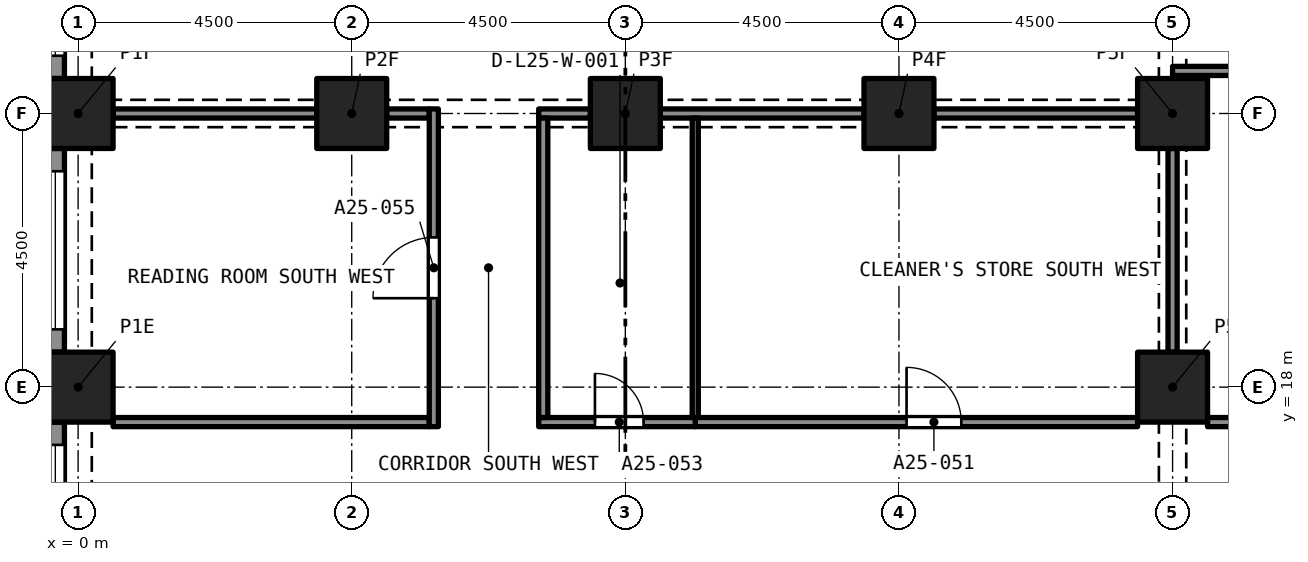
"""IFC4 building model, lengths in metres.
Left out: names, types, materials, properties, quantities, classifications, styles, units other than length and angle.
Written with IfcOpenShell. Run it as: python <this file> out.ifc"""

import sys

from ifc_helpers import new_model, si_unit, direction, frame, frame_2d, origin, origin_2d, place, context, subcontext, project, spatial, rectangle, extrude, element, fill, save


model = new_model("IFC4")
c1 = context("Model", 3, precision=1e-05, world=origin(), true_north=direction((0.0, 1.0)))
c2 = subcontext(c1, "Body", "Model", "MODEL_VIEW")
j1 = project(units=[si_unit("LENGTHUNIT", "METRE"), si_unit("PLANEANGLEUNIT", "RADIAN")], contexts=[c1])
p1 = place(None, origin())
s1 = spatial("IfcSite", under=j1, at=p1, CompositionType="ELEMENT")
p2 = place(p1, origin())
s2 = spatial("IfcBuilding", under=s1, at=p2, CompositionType="ELEMENT")
p3 = place(p2, frame((0.0, 0.0, 92.8)))
s3 = spatial("IfcBuildingStorey", under=s2, at=p3, CompositionType="ELEMENT", Elevation=92.8)
for number, where, z_axis, x_axis in (
    (1, (0.0, 18.0, 0.0), (0.0, 0.0, 1.0), (1.0, 0.0, 0.0)),
    (2, (18.0, 18.0, 0.0), (0.0, 0.0, 1.0), (1.0, 0.0, 0.0)),
    (3, (0.0, 22.5, 0.0), (0.0, 0.0, 1.0), (1.0, 0.0, 0.0)),
    (4, (4.5, 22.5, 0.0), (0.0, 0.0, 1.0), (1.0, 0.0, 0.0)),
    (5, (9.0, 22.5, 0.0), (0.0, 0.0, 1.0), (1.0, 0.0, 0.0)),
    (6, (13.5, 22.5, 0.0), (0.0, 0.0, 1.0), (1.0, 0.0, 0.0)),
    (7, (18.0, 22.5, 0.0), (0.0, 0.0, 1.0), (1.0, 0.0, 0.0)),
):
    element("IfcColumn", number, at=place(p3, frame(where, z_axis=z_axis, x_axis=x_axis)), inside=s3, PredefinedType="COLUMN", context=c2, shape_type="SweptSolid", body=[
        extrude(rectangle(XDim=1.15, YDim=1.15, at=origin_2d()), origin(), (0.0, 0.0, 1.0), 3.2),
    ])
p4 = place(p3, frame((-0.375, 23.075, 0.0), z_axis=(0.0, 0.0, 1.0), x_axis=(0.0, 1.0, 0.0)))
e8 = element("IfcWall", 8, at=p4, inside=s3, PredefinedType="SOLIDWALL", context=c2, shape_type="SweptSolid", body=[
    extrude(rectangle(XDim=3.35, YDim=0.3, at=frame_2d((1.675, 0.0))), origin(), (0.0, 0.0, 1.0), 3.2),
])
p5 = place(p4, frame((0.375, 0.0, 0.45)))
e9 = element("IfcOpeningElement", 9, at=p5, cuts=e8, PredefinedType="OPENING", context=c2, shape_type="SweptSolid", body=[
    extrude(rectangle(XDim=2.6, YDim=1.95, at=frame_2d((1.3, 0.975))), frame((0.0, 0.16, 0.0), z_axis=(0.0, -1.0, 0.0), x_axis=(1.0, 0.0, 0.0)), (0.0, 0.0, 1.0), 0.32),
])
p6 = place(p3, frame((-0.375, 18.575, 0.0), z_axis=(0.0, 0.0, 1.0), x_axis=(0.0, 1.0, 0.0)))
e10 = element("IfcWall", 10, at=p6, inside=s3, PredefinedType="SOLIDWALL", context=c2, shape_type="SweptSolid", body=[
    extrude(rectangle(XDim=3.35, YDim=0.3, at=frame_2d((1.675, 0.0))), origin(), (0.0, 0.0, 1.0), 3.2),
])
p7 = place(p6, frame((0.375, 0.0, 0.45)))
e11 = element("IfcOpeningElement", 11, at=p7, cuts=e10, PredefinedType="OPENING", context=c2, shape_type="SweptSolid", body=[
    extrude(rectangle(XDim=2.6, YDim=1.95, at=frame_2d((1.3, 0.975))), frame((0.0, 0.16, 0.0), z_axis=(0.0, -1.0, 0.0), x_axis=(1.0, 0.0, 0.0)), (0.0, 0.0, 1.0), 0.32),
])
p8 = place(p3, frame((-0.375, 14.075, 0.0), z_axis=(0.0, 0.0, 1.0), x_axis=(0.0, 1.0, 0.0)))
e12 = element("IfcWall", 12, at=p8, inside=s3, PredefinedType="SOLIDWALL", context=c2, shape_type="SweptSolid", body=[
    extrude(rectangle(XDim=3.35, YDim=0.3, at=frame_2d((1.675, 0.0))), origin(), (0.0, 0.0, 1.0), 3.2),
])
p9 = place(p8, frame((0.375, 0.0, 0.45)))
e13 = element("IfcOpeningElement", 13, at=p9, cuts=e12, PredefinedType="OPENING", context=c2, shape_type="SweptSolid", body=[
    extrude(rectangle(XDim=2.6, YDim=1.95, at=frame_2d((1.3, 0.975))), frame((0.0, 0.16, 0.0), z_axis=(0.0, -1.0, 0.0), x_axis=(1.0, 0.0, 0.0)), (0.0, 0.0, 1.0), 0.32),
])
p10 = place(p3, frame((18.575, 17.425, 0.0), z_axis=(0.0, 0.0, 1.0), x_axis=(1.0, 0.0, 0.0)))
e14 = element("IfcWall", 14, at=p10, inside=s3, PredefinedType="PARTITIONING", context=c2, shape_type="SweptSolid", body=[
    extrude(rectangle(XDim=5.2, YDim=0.15, at=frame_2d((2.6, 0.0))), origin(), (0.0, 0.0, 1.0), 2.75),
])
p11 = place(p3, frame((10.15, 17.425, 0.0), z_axis=(0.0, 0.0, 1.0), x_axis=(1.0, 0.0, 0.0)))
e15 = element("IfcWall", 15, at=p11, inside=s3, PredefinedType="PARTITIONING", context=c2, shape_type="SweptSolid", body=[
    extrude(rectangle(XDim=7.275, YDim=0.15, at=frame_2d((3.638, 0.0))), origin(), (0.0, 0.0, 1.0), 2.9),
])
p12 = place(p11, frame((3.475, 0.0, 0.0)))
e16 = element("IfcOpeningElement", 16, at=p12, cuts=e15, PredefinedType="OPENING", context=c2, shape_type="SweptSolid", body=[
    extrude(rectangle(XDim=0.9, YDim=2.1, at=frame_2d((0.45, 1.05))), frame((0.0, 0.085, 0.0), z_axis=(0.0, -1.0, 0.0), x_axis=(1.0, 0.0, 0.0)), (0.0, 0.0, 1.0), 0.17),
])
p13 = place(p3, frame((7.575, 17.425, 0.0), z_axis=(0.0, 0.0, 1.0), x_axis=(1.0, 0.0, 0.0)))
e17 = element("IfcWall", 17, at=p13, inside=s3, PredefinedType="PARTITIONING", context=c2, shape_type="SweptSolid", body=[
    extrude(rectangle(XDim=2.575, YDim=0.15, at=frame_2d((1.288, 0.0))), origin(), (0.0, 0.0, 1.0), 2.9),
])
p14 = place(p13, frame((0.925, 0.0, 0.0)))
e18 = element("IfcOpeningElement", 18, at=p14, cuts=e17, PredefinedType="OPENING", context=c2, shape_type="SweptSolid", body=[
    extrude(rectangle(XDim=0.8, YDim=2.1, at=frame_2d((0.4, 1.05))), frame((0.0, 0.085, 0.0), z_axis=(0.0, -1.0, 0.0), x_axis=(1.0, 0.0, 0.0)), (0.0, 0.0, 1.0), 0.17),
])
p15 = place(p3, frame((0.575, 17.425, 0.0), z_axis=(0.0, 0.0, 1.0), x_axis=(1.0, 0.0, 0.0)))
e19 = element("IfcWall", 19, at=p15, inside=s3, PredefinedType="PARTITIONING", context=c2, shape_type="SweptSolid", body=[
    extrude(rectangle(XDim=5.2, YDim=0.15, at=frame_2d((2.6, 0.0))), origin(), (0.0, 0.0, 1.0), 2.9),
])
p16 = place(p3, frame((18.0, 23.2, 0.0), z_axis=(0.0, 0.0, 1.0), x_axis=(1.0, 0.0, 0.0)))
e20 = element("IfcWall", 20, at=p16, inside=s3, PredefinedType="PARTITIONING", context=c2, shape_type="SweptSolid", body=[
    extrude(rectangle(XDim=5.775, YDim=0.15, at=frame_2d((2.887, 0.0))), origin(), (0.0, 0.0, 1.0), 2.75),
])
for number, where, z_axis, x_axis in (
    (21, (18.0, 18.575, 0.0), (0.0, 0.0, 1.0), (0.0, 1.0, 0.0)),
    (22, (14.075, 22.5, 0.0), (0.0, 0.0, 1.0), (1.0, 0.0, 0.0)),
    (23, (9.575, 22.5, 0.0), (0.0, 0.0, 1.0), (1.0, 0.0, 0.0)),
):
    element("IfcWall", number, at=place(p3, frame(where, z_axis=z_axis, x_axis=x_axis)), inside=s3, PredefinedType="PARTITIONING", context=c2, shape_type="SweptSolid", body=[
        extrude(rectangle(XDim=3.35, YDim=0.15, at=frame_2d((1.675, 0.0))), origin(), (0.0, 0.0, 1.0), 2.38),
    ])
p17 = place(p3, frame((7.575, 22.5, 0.0), z_axis=(0.0, 0.0, 1.0), x_axis=(1.0, 0.0, 0.0)))
e24 = element("IfcWall", 24, at=p17, inside=s3, PredefinedType="PARTITIONING", context=c2, shape_type="SweptSolid", body=[
    extrude(rectangle(XDim=0.85, YDim=0.15, at=frame_2d((0.425, 0.0))), origin(), (0.0, 0.0, 1.0), 2.38),
])
p18 = place(p3, frame((5.075, 22.5, 0.0), z_axis=(0.0, 0.0, 1.0), x_axis=(1.0, 0.0, 0.0)))
e25 = element("IfcWall", 25, at=p18, inside=s3, PredefinedType="PARTITIONING", context=c2, shape_type="SweptSolid", body=[
    extrude(rectangle(XDim=0.7, YDim=0.15, at=frame_2d((0.35, 0.0))), origin(), (0.0, 0.0, 1.0), 2.38),
])
p19 = place(p3, frame((0.575, 22.5, 0.0), z_axis=(0.0, 0.0, 1.0), x_axis=(1.0, 0.0, 0.0)))
e26 = element("IfcWall", 26, at=p19, inside=s3, PredefinedType="PARTITIONING", context=c2, shape_type="SweptSolid", body=[
    extrude(rectangle(XDim=3.35, YDim=0.15, at=frame_2d((1.675, 0.0))), origin(), (0.0, 0.0, 1.0), 2.38),
])
p20 = place(p3, frame((7.65, 17.5, 0.0), z_axis=(0.0, 0.0, 1.0), x_axis=(0.0, 1.0, 0.0)))
e27 = element("IfcWall", 27, at=p20, inside=s3, PredefinedType="PARTITIONING", context=c2, shape_type="SweptSolid", body=[
    extrude(rectangle(XDim=4.925, YDim=0.15, at=frame_2d((2.462, 0.0))), origin(), (0.0, 0.0, 1.0), 2.9),
])
p21 = place(p3, frame((5.85, 17.35, 0.0), z_axis=(0.0, 0.0, 1.0), x_axis=(0.0, 1.0, 0.0)))
e28 = element("IfcWall", 28, at=p21, inside=s3, PredefinedType="PARTITIONING", context=c2, shape_type="SweptSolid", body=[
    extrude(rectangle(XDim=5.225, YDim=0.15, at=frame_2d((2.612, 0.0))), origin(), (0.0, 0.0, 1.0), 2.9),
])
p22 = place(p21, frame((2.113, 0.0, 0.0)))
e29 = element("IfcOpeningElement", 29, at=p22, cuts=e28, PredefinedType="OPENING", context=c2, shape_type="SweptSolid", body=[
    extrude(rectangle(XDim=1.0, YDim=2.1, at=frame_2d((0.5, 1.05))), frame((0.0, 0.085, 0.0), z_axis=(0.0, -1.0, 0.0), x_axis=(1.0, 0.0, 0.0)), (0.0, 0.0, 1.0), 0.17),
])
p23 = place(p3, frame((10.15, 17.5, 0.0), z_axis=(0.0, 0.0, 1.0), x_axis=(0.0, 1.0, 0.0)))
e30 = element("IfcWall", 30, at=p23, inside=s3, PredefinedType="PARTITIONING", context=c2, shape_type="SweptSolid", body=[
    extrude(rectangle(XDim=4.925, YDim=0.1, at=frame_2d((2.462, 0.0))), origin(), (0.0, 0.0, 1.0), 2.9),
])
p24 = place(p5, origin())
e31 = element("IfcWindow", 31, at=p24, inside=s3, PartitioningType="SINGLE_PANEL", PredefinedType="WINDOW", context=c2, shape_type="SweptSolid", body=[
    extrude(rectangle(XDim=2.6, YDim=1.95, at=frame_2d((1.3, 0.975))), frame((0.0, 0.03, 0.0), z_axis=(0.0, -1.0, 0.0), x_axis=(1.0, 0.0, 0.0)), (0.0, 0.0, 1.0), 0.06),
])
fill(e9, e31)
p25 = place(p7, origin())
e32 = element("IfcWindow", 32, at=p25, inside=s3, PartitioningType="SINGLE_PANEL", PredefinedType="WINDOW", context=c2, shape_type="SweptSolid", body=[
    extrude(rectangle(XDim=2.6, YDim=1.95, at=frame_2d((1.3, 0.975))), frame((0.0, 0.03, 0.0), z_axis=(0.0, -1.0, 0.0), x_axis=(1.0, 0.0, 0.0)), (0.0, 0.0, 1.0), 0.06),
])
fill(e11, e32)
p26 = place(p9, origin())
e33 = element("IfcWindow", 33, at=p26, inside=s3, PartitioningType="SINGLE_PANEL", PredefinedType="WINDOW", context=c2, shape_type="SweptSolid", body=[
    extrude(rectangle(XDim=2.6, YDim=1.95, at=frame_2d((1.3, 0.975))), frame((0.0, 0.03, 0.0), z_axis=(0.0, -1.0, 0.0), x_axis=(1.0, 0.0, 0.0)), (0.0, 0.0, 1.0), 0.06),
])
fill(e13, e33)
p27 = place(p12, origin())
e34 = element("IfcDoor", 34, at=p27, inside=s3, OperationType="SINGLE_SWING_RIGHT", PredefinedType="DOOR", context=c2, shape_type="SweptSolid", body=[
    extrude(rectangle(XDim=0.9, YDim=2.1, at=frame_2d((0.45, 1.05))), frame((0.0, 0.025, 0.0), z_axis=(0.0, -1.0, 0.0), x_axis=(1.0, 0.0, 0.0)), (0.0, 0.0, 1.0), 0.05),
])
fill(e16, e34)
p28 = place(p14, origin())
e35 = element("IfcDoor", 35, at=p28, inside=s3, OperationType="SINGLE_SWING_RIGHT", PredefinedType="DOOR", context=c2, shape_type="SweptSolid", body=[
    extrude(rectangle(XDim=0.8, YDim=2.1, at=frame_2d((0.4, 1.05))), frame((0.0, 0.025, 0.0), z_axis=(0.0, -1.0, 0.0), x_axis=(1.0, 0.0, 0.0)), (0.0, 0.0, 1.0), 0.05),
])
fill(e18, e35)
p29 = place(p22, origin())
e36 = element("IfcDoor", 36, at=p29, inside=s3, OperationType="SINGLE_SWING_LEFT", PredefinedType="DOOR", context=c2, shape_type="SweptSolid", body=[
    extrude(rectangle(XDim=1.0, YDim=2.1, at=frame_2d((0.5, 1.05))), frame((0.0, 0.025, 0.0), z_axis=(0.0, -1.0, 0.0), x_axis=(1.0, 0.0, 0.0)), (0.0, 0.0, 1.0), 0.05),
])
fill(e29, e36)
save(model, sys.argv[1])
